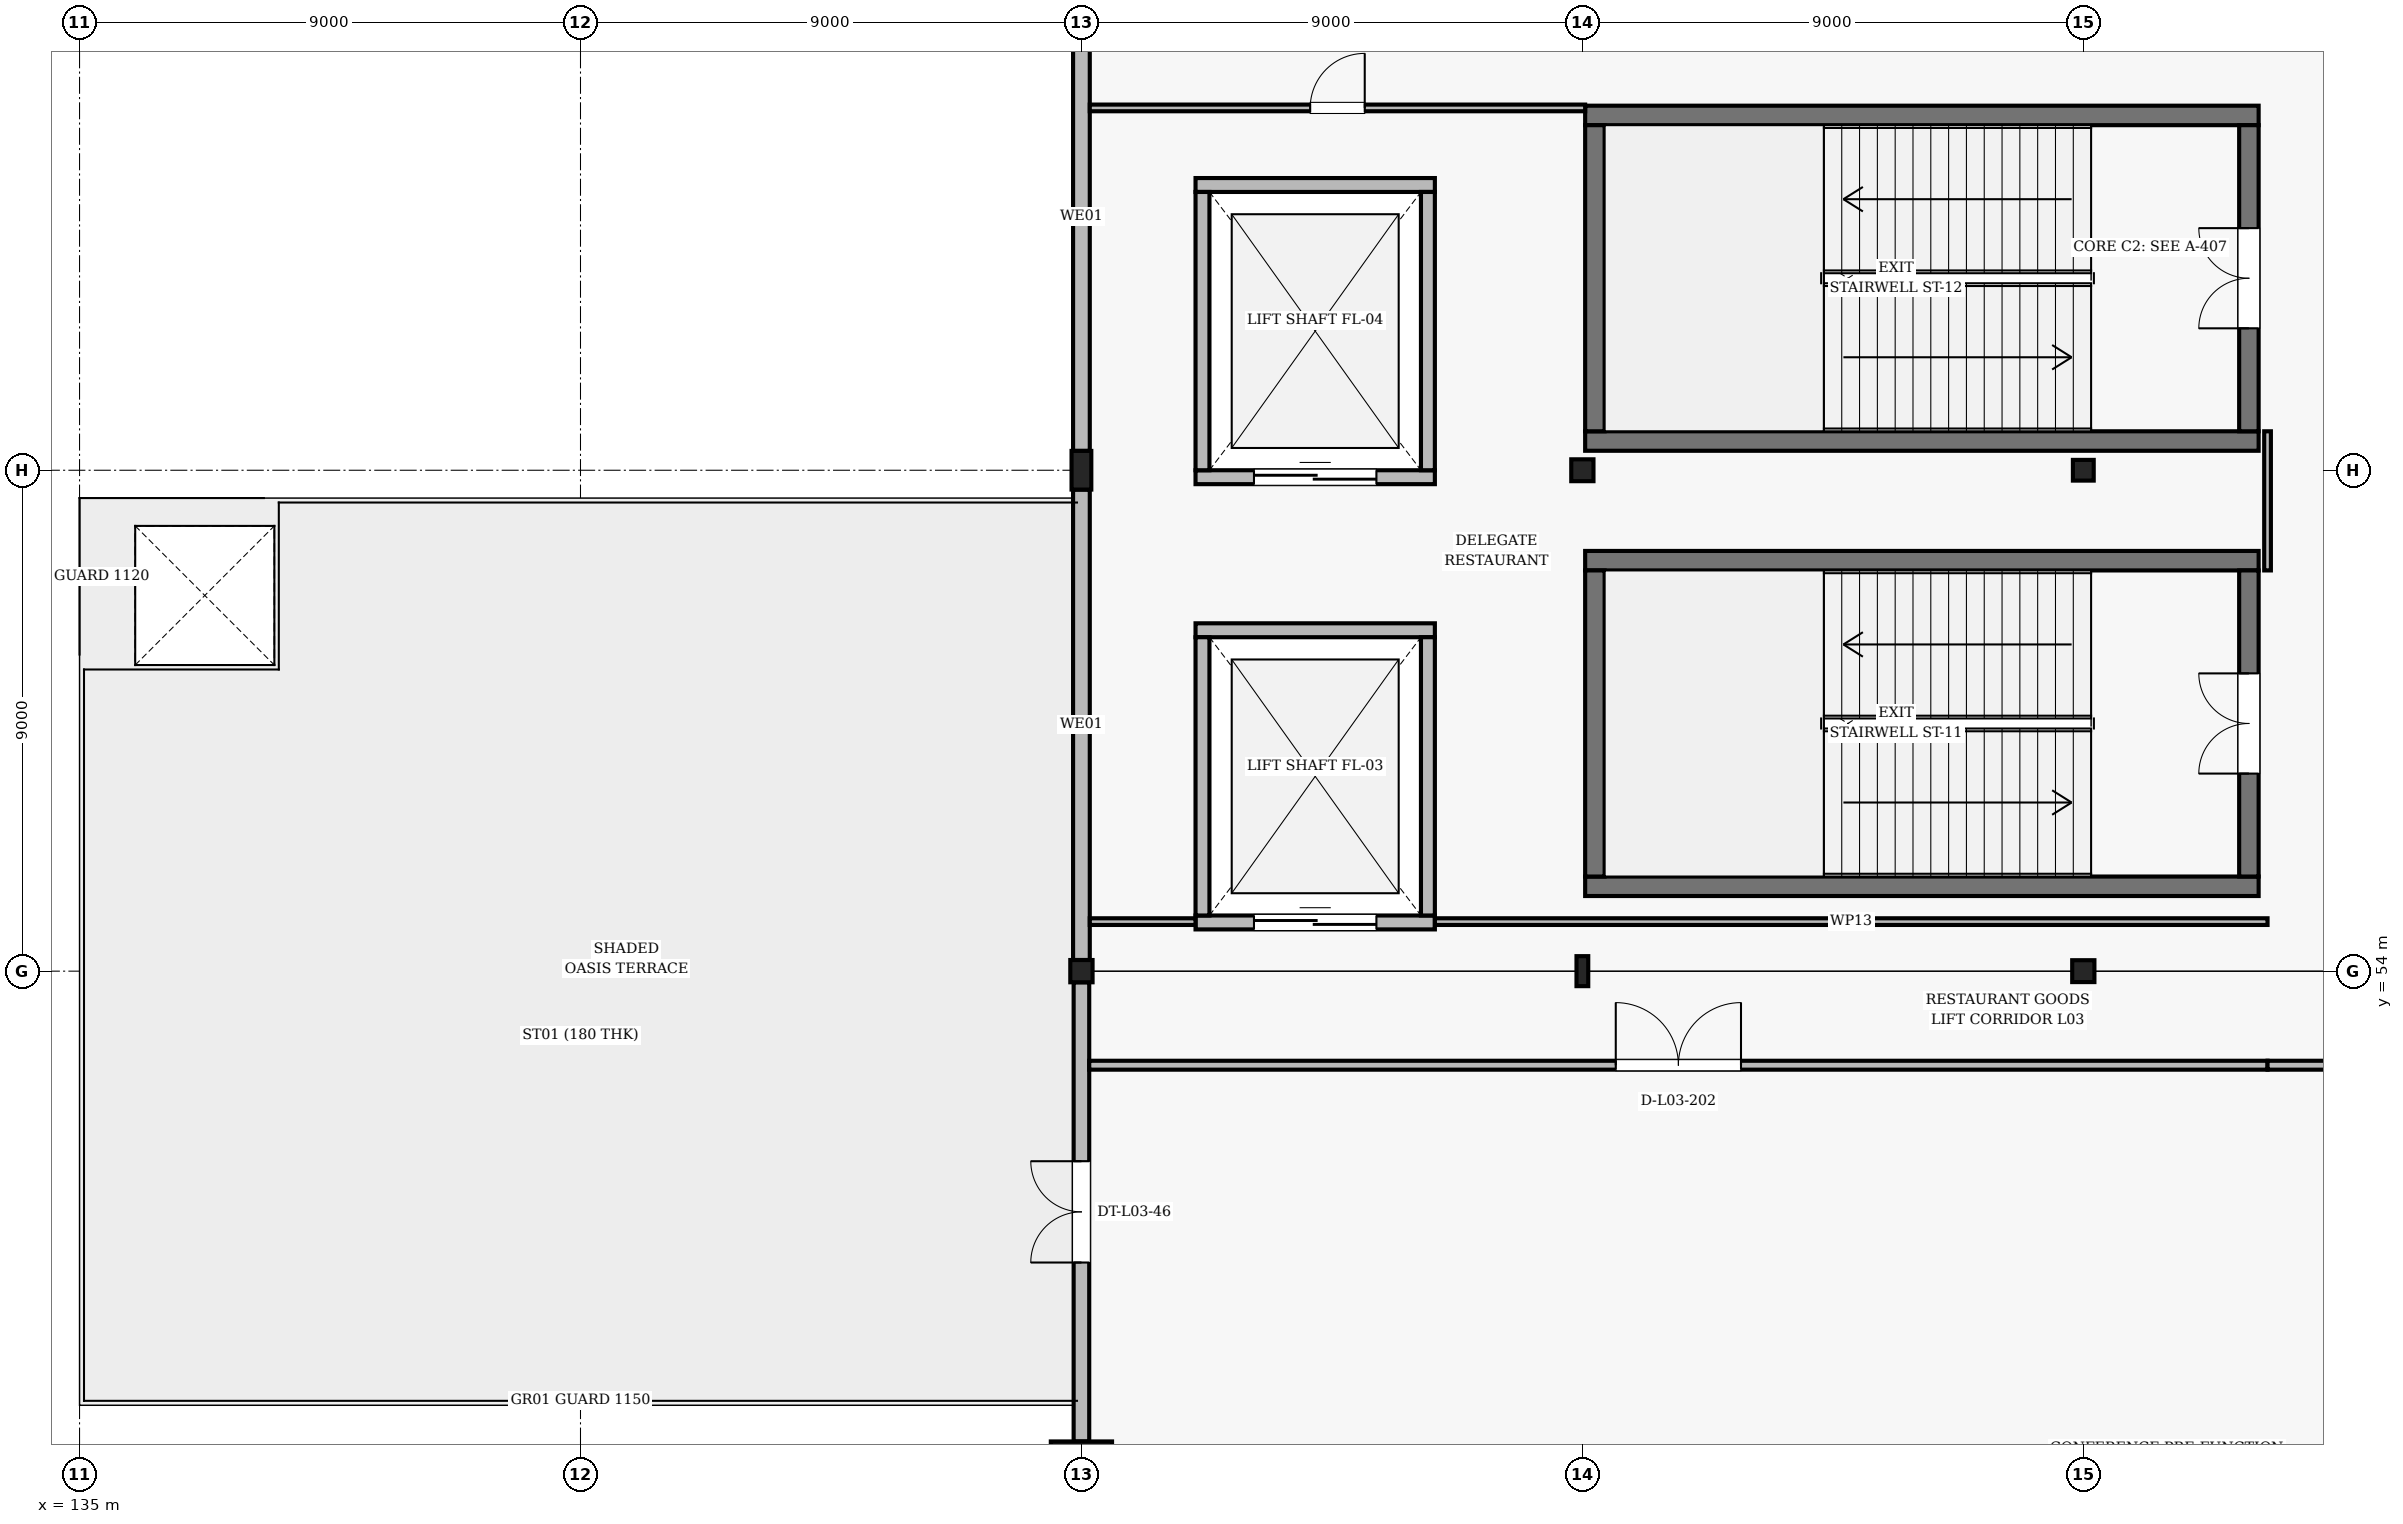
"""IFC4 building model, lengths in metres.
Left out: names, types, materials, properties, quantities, classifications, styles, units other than length and angle.
Written with IfcOpenShell. Run it as: python <this file> out.ifc"""

import sys

from ifc_helpers import new_model, si_unit, direction, frame, frame_2d, origin, origin_2d, place, context, subcontext, project, spatial, rectangle, hollow_rectangle, i_section, extrude, element, fill, save


model = new_model("IFC4")
c1 = context("Model", 3, precision=1e-05, world=origin(), true_north=direction((0.0, 1.0)))
c2 = subcontext(c1, "Body", "Model", "MODEL_VIEW")
j1 = project(units=[si_unit("LENGTHUNIT", "METRE"), si_unit("PLANEANGLEUNIT", "RADIAN")], contexts=[c1])
p1 = place(None, origin())
s1 = spatial("IfcSite", under=j1, at=p1, CompositionType="ELEMENT")
p2 = place(p1, origin())
s2 = spatial("IfcBuilding", under=s1, at=p2, CompositionType="ELEMENT")
p3 = place(p2, frame((0.0, 0.0, 15.6)))
s3 = spatial("IfcBuildingStorey", under=s2, at=p3, CompositionType="ELEMENT", Elevation=15.6)
p4 = place(p3, frame((153.0, 45.0, 0.0), z_axis=(0.0, 0.0, 1.0), x_axis=(1.0, 0.0, 0.0)))
e1 = element("IfcColumn", 1, at=p4, inside=s3, PredefinedType="COLUMN", context=c2, shape_type="SweptSolid", body=[
    extrude(rectangle(XDim=1.1, YDim=1.1, at=origin_2d()), origin(), (0.0, 0.0, 1.0), 4.8),
])
p5 = place(p3, frame((153.0, 54.0, 0.0), z_axis=(0.0, 0.0, 1.0), x_axis=(1.0, 0.0, 0.0)))
e2 = element("IfcColumn", 2, at=p5, inside=s3, PredefinedType="COLUMN", context=c2, shape_type="SweptSolid", body=[
    extrude(hollow_rectangle(XDim=0.4, YDim=0.4, WallThickness=0.016, InnerFilletRadius=0.016, OuterFilletRadius=0.032, at=origin_2d()), origin(), (0.0, 0.0, 1.0), 4.8),
])
p6 = place(p3, frame((153.0, 63.0, 0.0), z_axis=(0.0, 0.0, 1.0), x_axis=(1.0, 0.0, 0.0)))
e3 = element("IfcColumn", 3, at=p6, inside=s3, PredefinedType="COLUMN", context=c2, shape_type="SweptSolid", body=[
    extrude(i_section(OverallWidth=0.355, OverallDepth=0.695, WebThickness=0.015, FlangeThickness=0.025, FilletRadius=0.018, at=origin_2d()), origin(), (0.0, 0.0, 1.0), 4.8),
])
p7 = place(p3, frame((162.0, 54.0, 0.0), z_axis=(0.0, 0.0, 1.0), x_axis=(1.0, 0.0, 0.0)))
e4 = element("IfcColumn", 4, at=p7, inside=s3, PredefinedType="COLUMN", context=c2, shape_type="SweptSolid", body=[
    extrude(i_section(OverallWidth=0.211, OverallDepth=0.539, WebThickness=0.012, FlangeThickness=0.019, FilletRadius=0.014, at=origin_2d()), origin(), (0.0, 0.0, 1.0), 4.8),
])
for number, where, z_axis, x_axis in (
    (5, (162.0, 63.0, 0.0), (0.0, 0.0, 1.0), (1.0, 0.0, 0.0)),
    (6, (171.0, 54.0, 0.0), (0.0, 0.0, 1.0), (1.0, 0.0, 0.0)),
):
    element("IfcColumn", number, at=place(p3, frame(where, z_axis=z_axis, x_axis=x_axis)), inside=s3, PredefinedType="COLUMN", context=c2, shape_type="SweptSolid", body=[
        extrude(i_section(OverallWidth=0.399, OverallDepth=0.393, WebThickness=0.023, FlangeThickness=0.037, FilletRadius=0.018, at=origin_2d()), origin(), (0.0, 0.0, 1.0), 4.8),
    ])
p8 = place(p3, frame((171.0, 63.0, 0.0), z_axis=(0.0, 0.0, 1.0), x_axis=(1.0, 0.0, 0.0)))
e7 = element("IfcColumn", 7, at=p8, inside=s3, PredefinedType="COLUMN", context=c2, shape_type="SweptSolid", body=[
    extrude(i_section(OverallWidth=0.374, OverallDepth=0.372, WebThickness=0.016, FlangeThickness=0.026, FilletRadius=0.016, at=origin_2d()), origin(), (0.0, 0.0, 1.0), 4.8),
])
p9 = place(p3, frame((153.0, 45.55, 0.0), z_axis=(0.0, 0.0, 1.0), x_axis=(0.0, 1.0, 0.0)))
e8 = element("IfcWall", 8, at=p9, inside=s3, PredefinedType="SOLIDWALL", context=c2, shape_type="SweptSolid", body=[
    extrude(rectangle(XDim=8.25, YDim=0.28, at=frame_2d((4.125, 0.0))), origin(), (0.0, 0.0, 1.0), 3.812),
])
p10 = place(p9, frame((3.215, 0.0, 0.0)))
e9 = element("IfcOpeningElement", 9, at=p10, cuts=e8, PredefinedType="OPENING", context=c2, shape_type="SweptSolid", body=[
    extrude(rectangle(XDim=1.82, YDim=2.25, at=frame_2d((0.91, 1.125))), frame((0.0, 0.15, 0.0), z_axis=(0.0, -1.0, 0.0), x_axis=(1.0, 0.0, 0.0)), (0.0, 0.0, 1.0), 0.3),
])
p11 = place(p3, frame((153.0, 54.2, 0.0), z_axis=(0.0, 0.0, 1.0), x_axis=(0.0, 1.0, 0.0)))
e10 = element("IfcWall", 10, at=p11, inside=s3, PredefinedType="SOLIDWALL", context=c2, shape_type="SweptSolid", body=[
    extrude(rectangle(XDim=8.453, YDim=0.3, at=frame_2d((4.226, 0.0))), origin(), (0.0, 0.0, 1.0), 3.89),
])
p12 = place(p3, frame((153.0, 63.347, 0.0), z_axis=(0.0, 0.0, 1.0), x_axis=(0.0, 1.0, 0.0)))
e11 = element("IfcWall", 11, at=p12, inside=s3, PredefinedType="SOLIDWALL", context=c2, shape_type="SweptSolid", body=[
    extrude(rectangle(XDim=8.44, YDim=0.3, at=frame_2d((4.22, 0.0))), origin(), (0.0, 0.0, 1.0), 3.901),
])
for number, where, z_axis, x_axis in (
    (12, (162.05, 55.525, 0.0), (0.0, 0.0, 1.0), (1.0, 0.0, 0.0)),
    (13, (174.15, 61.375, 0.0), (0.0, 0.0, 1.0), (-1.0, 0.0, 0.0)),
):
    element("IfcWall", number, at=place(p3, frame(where, z_axis=z_axis, x_axis=x_axis)), inside=s3, PredefinedType="SHEAR", context=c2, shape_type="SweptSolid", body=[
        extrude(rectangle(XDim=12.1, YDim=0.35, at=frame_2d((6.05, 0.0))), origin(), (0.0, 0.0, 1.0), 4.6),
    ])
p13 = place(p3, frame((162.225, 61.2, 0.0), z_axis=(0.0, 0.0, 1.0), x_axis=(0.0, -1.0, 0.0)))
e14 = element("IfcWall", 14, at=p13, inside=s3, PredefinedType="SHEAR", context=c2, shape_type="SweptSolid", body=[
    extrude(rectangle(XDim=5.5, YDim=0.35, at=frame_2d((2.75, 0.0))), origin(), (0.0, 0.0, 1.0), 4.6),
])
p14 = place(p3, frame((173.975, 55.7, 0.0), z_axis=(0.0, 0.0, 1.0), x_axis=(0.0, 1.0, 0.0)))
e15 = element("IfcWall", 15, at=p14, inside=s3, PredefinedType="SHEAR", context=c2, shape_type="SweptSolid", body=[
    extrude(rectangle(XDim=5.5, YDim=0.35, at=frame_2d((2.75, 0.0))), origin(), (0.0, 0.0, 1.0), 4.6),
])
p15 = place(p14, frame((1.85, 0.0, 0.0)))
e16 = element("IfcOpeningElement", 16, at=p15, cuts=e15, PredefinedType="OPENING", context=c2, shape_type="SweptSolid", body=[
    extrude(rectangle(XDim=1.8, YDim=2.2, at=frame_2d((0.9, 1.1))), frame((0.0, 0.185, 0.0), z_axis=(0.0, -1.0, 0.0), x_axis=(1.0, 0.0, 0.0)), (0.0, 0.0, 1.0), 0.37),
])
for number, where, z_axis, x_axis in (
    (17, (162.05, 63.525, 0.0), (0.0, 0.0, 1.0), (1.0, 0.0, 0.0)),
    (18, (174.15, 69.375, 0.0), (0.0, 0.0, 1.0), (-1.0, 0.0, 0.0)),
):
    element("IfcWall", number, at=place(p3, frame(where, z_axis=z_axis, x_axis=x_axis)), inside=s3, PredefinedType="SHEAR", context=c2, shape_type="SweptSolid", body=[
        extrude(rectangle(XDim=12.1, YDim=0.35, at=frame_2d((6.05, 0.0))), origin(), (0.0, 0.0, 1.0), 4.6),
    ])
p16 = place(p3, frame((162.225, 69.2, 0.0), z_axis=(0.0, 0.0, 1.0), x_axis=(0.0, -1.0, 0.0)))
e19 = element("IfcWall", 19, at=p16, inside=s3, PredefinedType="SHEAR", context=c2, shape_type="SweptSolid", body=[
    extrude(rectangle(XDim=5.5, YDim=0.35, at=frame_2d((2.75, 0.0))), origin(), (0.0, 0.0, 1.0), 4.6),
])
p17 = place(p3, frame((173.975, 63.7, 0.0), z_axis=(0.0, 0.0, 1.0), x_axis=(0.0, 1.0, 0.0)))
e20 = element("IfcWall", 20, at=p17, inside=s3, PredefinedType="SHEAR", context=c2, shape_type="SweptSolid", body=[
    extrude(rectangle(XDim=5.5, YDim=0.35, at=frame_2d((2.75, 0.0))), origin(), (0.0, 0.0, 1.0), 4.6),
])
p18 = place(p17, frame((1.85, 0.0, 0.0)))
e21 = element("IfcOpeningElement", 21, at=p18, cuts=e20, PredefinedType="OPENING", context=c2, shape_type="SweptSolid", body=[
    extrude(rectangle(XDim=1.8, YDim=2.2, at=frame_2d((0.9, 1.1))), frame((0.0, 0.185, 0.0), z_axis=(0.0, -1.0, 0.0), x_axis=(1.0, 0.0, 0.0)), (0.0, 0.0, 1.0), 0.37),
])
p19 = place(p3, frame((155.05, 54.875, 0.0), z_axis=(0.0, 0.0, 1.0), x_axis=(1.0, 0.0, 0.0)))
e22 = element("IfcWall", 22, at=p19, inside=s3, PredefinedType="SOLIDWALL", context=c2, shape_type="SweptSolid", body=[
    extrude(rectangle(XDim=4.3, YDim=0.25, at=frame_2d((2.15, 0.0))), origin(), (0.0, 0.0, 1.0), 4.6),
])
p20 = place(p19, frame((1.05, 0.0, 0.0)))
e23 = element("IfcOpeningElement", 23, at=p20, cuts=e22, PredefinedType="OPENING", context=c2, shape_type="SweptSolid", body=[
    extrude(rectangle(XDim=2.2, YDim=2.5, at=frame_2d((1.1, 1.25))), frame((0.0, 0.135, 0.0), z_axis=(0.0, -1.0, 0.0), x_axis=(1.0, 0.0, 0.0)), (0.0, 0.0, 1.0), 0.27),
])
p21 = place(p3, frame((159.35, 60.125, 0.0), z_axis=(0.0, 0.0, 1.0), x_axis=(-1.0, 0.0, 0.0)))
e24 = element("IfcWall", 24, at=p21, inside=s3, PredefinedType="SOLIDWALL", context=c2, shape_type="SweptSolid", body=[
    extrude(rectangle(XDim=4.3, YDim=0.25, at=frame_2d((2.15, 0.0))), origin(), (0.0, 0.0, 1.0), 4.6),
])
for number, where, z_axis, x_axis in (
    (25, (155.175, 60.0, 0.0), (0.0, 0.0, 1.0), (0.0, -1.0, 0.0)),
    (26, (159.225, 55.0, 0.0), (0.0, 0.0, 1.0), (0.0, 1.0, 0.0)),
):
    element("IfcWall", number, at=place(p3, frame(where, z_axis=z_axis, x_axis=x_axis)), inside=s3, PredefinedType="SOLIDWALL", context=c2, shape_type="SweptSolid", body=[
        extrude(rectangle(XDim=5.0, YDim=0.25, at=frame_2d((2.5, 0.0))), origin(), (0.0, 0.0, 1.0), 4.6),
    ])
p22 = place(p3, frame((155.05, 62.875, 0.0), z_axis=(0.0, 0.0, 1.0), x_axis=(1.0, 0.0, 0.0)))
e27 = element("IfcWall", 27, at=p22, inside=s3, PredefinedType="SOLIDWALL", context=c2, shape_type="SweptSolid", body=[
    extrude(rectangle(XDim=4.3, YDim=0.25, at=frame_2d((2.15, 0.0))), origin(), (0.0, 0.0, 1.0), 4.6),
])
p23 = place(p22, frame((1.05, 0.0, 0.0)))
e28 = element("IfcOpeningElement", 28, at=p23, cuts=e27, PredefinedType="OPENING", context=c2, shape_type="SweptSolid", body=[
    extrude(rectangle(XDim=2.2, YDim=2.5, at=frame_2d((1.1, 1.25))), frame((0.0, 0.135, 0.0), z_axis=(0.0, -1.0, 0.0), x_axis=(1.0, 0.0, 0.0)), (0.0, 0.0, 1.0), 0.27),
])
p24 = place(p3, frame((159.35, 68.125, 0.0), z_axis=(0.0, 0.0, 1.0), x_axis=(-1.0, 0.0, 0.0)))
e29 = element("IfcWall", 29, at=p24, inside=s3, PredefinedType="SOLIDWALL", context=c2, shape_type="SweptSolid", body=[
    extrude(rectangle(XDim=4.3, YDim=0.25, at=frame_2d((2.15, 0.0))), origin(), (0.0, 0.0, 1.0), 4.6),
])
for number, where, z_axis, x_axis in (
    (30, (155.175, 68.0, 0.0), (0.0, 0.0, 1.0), (0.0, -1.0, 0.0)),
    (31, (159.225, 63.0, 0.0), (0.0, 0.0, 1.0), (0.0, 1.0, 0.0)),
):
    element("IfcWall", number, at=place(p3, frame(where, z_axis=z_axis, x_axis=x_axis)), inside=s3, PredefinedType="SOLIDWALL", context=c2, shape_type="SweptSolid", body=[
        extrude(rectangle(XDim=5.0, YDim=0.25, at=frame_2d((2.5, 0.0))), origin(), (0.0, 0.0, 1.0), 4.6),
    ])
p25 = place(p3, frame((153.15, 69.51, 0.0), z_axis=(0.0, 0.0, 1.0), x_axis=(1.0, 0.0, 0.0)))
e32 = element("IfcWall", 32, at=p25, inside=s3, PredefinedType="PARTITIONING", context=c2, shape_type="SweptSolid", body=[
    extrude(rectangle(XDim=8.9, YDim=0.12, at=frame_2d((4.45, 0.0))), origin(), (0.0, 0.0, 1.0), 3.89),
])
p26 = place(p25, frame((3.96, 0.0, 0.0)))
e33 = element("IfcOpeningElement", 33, at=p26, cuts=e32, PredefinedType="OPENING", context=c2, shape_type="SweptSolid", body=[
    extrude(rectangle(XDim=0.98, YDim=2.15, at=frame_2d((0.49, 1.075))), frame((0.0, 0.07, 0.0), z_axis=(0.0, -1.0, 0.0), x_axis=(1.0, 0.0, 0.0)), (0.0, 0.0, 1.0), 0.14),
])
p27 = place(p3, frame((174.31, 63.7, 0.0), z_axis=(0.0, 0.0, 1.0), x_axis=(0.0, -1.0, 0.0)))
e34 = element("IfcWall", 34, at=p27, inside=s3, PredefinedType="PARTITIONING", context=c2, shape_type="SweptSolid", body=[
    extrude(rectangle(XDim=2.5, YDim=0.12, at=frame_2d((1.25, 0.0))), origin(), (0.0, 0.0, 1.0), 3.89),
])
p28 = place(p3, frame((174.31, 54.89, 0.0), z_axis=(0.0, 0.0, 1.0), x_axis=(-1.0, 0.0, 0.0)))
e35 = element("IfcWall", 35, at=p28, inside=s3, PredefinedType="PARTITIONING", context=c2, shape_type="SweptSolid", body=[
    extrude(rectangle(XDim=14.96, YDim=0.12, at=frame_2d((7.48, 0.0))), origin(), (0.0, 0.0, 1.0), 3.812),
])
p29 = place(p3, frame((155.05, 54.89, 0.0), z_axis=(0.0, 0.0, 1.0), x_axis=(-1.0, 0.0, 0.0)))
e36 = element("IfcWall", 36, at=p29, inside=s3, PredefinedType="PARTITIONING", context=c2, shape_type="SweptSolid", body=[
    extrude(rectangle(XDim=1.9, YDim=0.12, at=frame_2d((0.95, 0.0))), origin(), (0.0, 0.0, 1.0), 3.89),
])
p30 = place(p3, frame((153.14, 52.31, 0.0), z_axis=(0.0, 0.0, 1.0), x_axis=(1.0, 0.0, 0.0)))
e37 = element("IfcWall", 37, at=p30, inside=s3, PredefinedType="PARTITIONING", context=c2, shape_type="SweptSolid", body=[
    extrude(rectangle(XDim=21.17, YDim=0.16, at=frame_2d((10.585, 0.0))), origin(), (0.0, 0.0, 1.0), 3.73),
])
p31 = place(p30, frame((9.46, 0.0, 0.0)))
e38 = element("IfcOpeningElement", 38, at=p31, cuts=e37, PredefinedType="OPENING", context=c2, shape_type="SweptSolid", body=[
    extrude(rectangle(XDim=2.25, YDim=2.4, at=frame_2d((1.125, 1.2))), frame((0.0, 0.09, 0.0), z_axis=(0.0, -1.0, 0.0), x_axis=(1.0, 0.0, 0.0)), (0.0, 0.0, 1.0), 0.18),
])
p32 = place(p3, frame((174.31, 52.31, 0.0), z_axis=(0.0, 0.0, 1.0), x_axis=(1.0, 0.0, 0.0)))
e39 = element("IfcWall", 39, at=p32, inside=s3, PredefinedType="PARTITIONING", context=c2, shape_type="SweptSolid", body=[
    extrude(rectangle(XDim=4.94, YDim=0.16, at=frame_2d((2.47, 0.0))), origin(), (0.0, 0.0, 1.0), 4.128),
])
p33 = place(p10, origin())
e40 = element("IfcDoor", 40, at=p33, inside=s3, OperationType="DOUBLE_DOOR_SINGLE_SWING", PredefinedType="DOOR", context=c2, shape_type="SweptSolid", body=[
    extrude(rectangle(XDim=1.82, YDim=2.25, at=frame_2d((0.91, 1.125))), frame((0.0, 0.025, 0.0), z_axis=(0.0, -1.0, 0.0), x_axis=(1.0, 0.0, 0.0)), (0.0, 0.0, 1.0), 0.05),
])
fill(e9, e40)
p34 = place(p15, origin())
e41 = element("IfcDoor", 41, at=p34, inside=s3, OperationType="DOUBLE_DOOR_SINGLE_SWING", PredefinedType="DOOR", context=c2, shape_type="SweptSolid", body=[
    extrude(rectangle(XDim=1.8, YDim=2.2, at=frame_2d((0.9, 1.1))), frame((0.0, 0.025, 0.0), z_axis=(0.0, -1.0, 0.0), x_axis=(1.0, 0.0, 0.0)), (0.0, 0.0, 1.0), 0.05),
])
fill(e16, e41)
p35 = place(p18, origin())
e42 = element("IfcDoor", 42, at=p35, inside=s3, OperationType="DOUBLE_DOOR_SINGLE_SWING", PredefinedType="DOOR", context=c2, shape_type="SweptSolid", body=[
    extrude(rectangle(XDim=1.8, YDim=2.2, at=frame_2d((0.9, 1.1))), frame((0.0, 0.025, 0.0), z_axis=(0.0, -1.0, 0.0), x_axis=(1.0, 0.0, 0.0)), (0.0, 0.0, 1.0), 0.05),
])
fill(e21, e42)
p36 = place(p20, origin())
e43 = element("IfcDoor", 43, at=p36, inside=s3, OperationType="DOUBLE_DOOR_SLIDING", PredefinedType="DOOR", context=c2, shape_type="SweptSolid", body=[
    extrude(rectangle(XDim=2.2, YDim=2.5, at=frame_2d((1.1, 1.25))), frame((0.0, 0.025, 0.0), z_axis=(0.0, -1.0, 0.0), x_axis=(1.0, 0.0, 0.0)), (0.0, 0.0, 1.0), 0.05),
])
fill(e23, e43)
p37 = place(p23, origin())
e44 = element("IfcDoor", 44, at=p37, inside=s3, OperationType="DOUBLE_DOOR_SLIDING", PredefinedType="DOOR", context=c2, shape_type="SweptSolid", body=[
    extrude(rectangle(XDim=2.2, YDim=2.5, at=frame_2d((1.1, 1.25))), frame((0.0, 0.025, 0.0), z_axis=(0.0, -1.0, 0.0), x_axis=(1.0, 0.0, 0.0)), (0.0, 0.0, 1.0), 0.05),
])
fill(e28, e44)
p38 = place(p26, origin())
e45 = element("IfcDoor", 45, at=p38, inside=s3, OperationType="SINGLE_SWING_RIGHT", PredefinedType="DOOR", context=c2, shape_type="SweptSolid", body=[
    extrude(rectangle(XDim=0.98, YDim=2.15, at=frame_2d((0.49, 1.075))), frame((0.0, 0.025, 0.0), z_axis=(0.0, -1.0, 0.0), x_axis=(1.0, 0.0, 0.0)), (0.0, 0.0, 1.0), 0.05),
])
fill(e33, e45)
p39 = place(p31, origin())
e46 = element("IfcDoor", 46, at=p39, inside=s3, OperationType="DOUBLE_DOOR_SINGLE_SWING", PredefinedType="DOOR", context=c2, shape_type="SweptSolid", body=[
    extrude(rectangle(XDim=2.25, YDim=2.4, at=frame_2d((1.125, 1.2))), frame((0.0, 0.025, 0.0), z_axis=(0.0, -1.0, 0.0), x_axis=(1.0, 0.0, 0.0)), (0.0, 0.0, 1.0), 0.05),
])
fill(e38, e46)
save(model, sys.argv[1])
